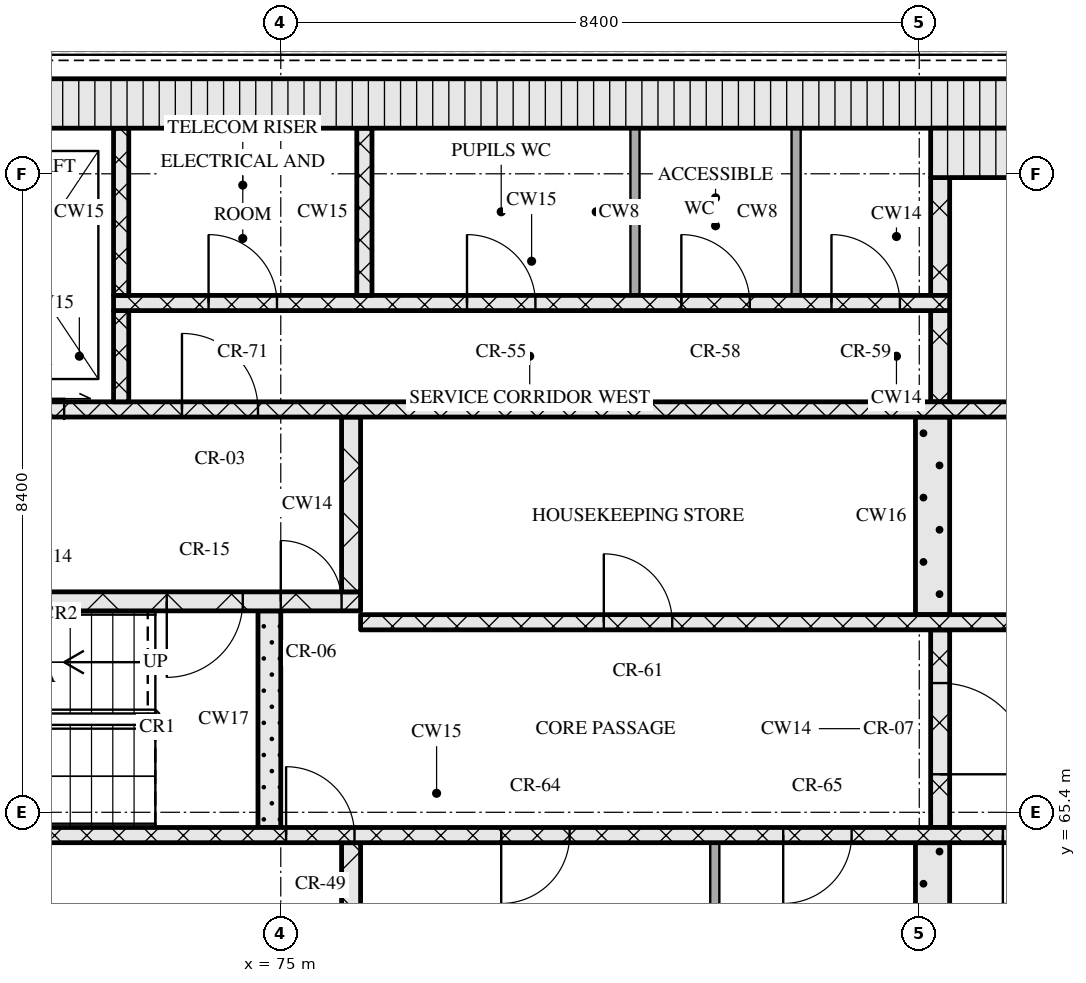
"""IFC4 building model, lengths in metres.
Left out: names, types, materials, properties, quantities, classifications, styles, units other than length and angle.
Written with IfcOpenShell. Run it as: python <this file> out.ifc"""

import sys

from ifc_helpers import new_model, si_unit, direction, frame, frame_2d, origin, place, context, subcontext, project, spatial, rectangle, extrude, element, fill, save


model = new_model("IFC4")
c1 = context("Model", 3, precision=1e-05, world=origin(), true_north=direction((0.0, 1.0)))
c2 = subcontext(c1, "Body", "Model", "MODEL_VIEW")
j1 = project(units=[si_unit("LENGTHUNIT", "METRE"), si_unit("PLANEANGLEUNIT", "RADIAN")], contexts=[c1])
p1 = place(None, origin())
s1 = spatial("IfcSite", under=j1, at=p1, CompositionType="ELEMENT")
p2 = place(p1, origin())
s2 = spatial("IfcBuilding", under=s1, at=p2, CompositionType="ELEMENT")
p3 = place(p2, frame((0.0, 0.0, 223.5)))
s3 = spatial("IfcBuildingStorey", under=s2, at=p3, CompositionType="ELEMENT", Elevation=223.5)
p4 = place(p3, frame((67.15, 74.725, 0.0), z_axis=(0.0, 0.0, 1.0), x_axis=(1.0, 0.0, 0.0)))
e1 = element("IfcWall", 1, at=p4, inside=s3, PredefinedType="SOLIDWALL", context=c2, shape_type="SweptSolid", body=[
    extrude(rectangle(XDim=40.9, YDim=0.65, at=frame_2d((20.45, 0.0))), origin(), (0.0, 0.0, 1.0), 3.32),
])
p5 = place(p3, frame((75.925, 62.4, 0.0), z_axis=(0.0, 0.0, 1.0), x_axis=(0.0, 1.0, 0.0)))
e2 = element("IfcWall", 2, at=p5, inside=s3, PredefinedType="SOLIDWALL", context=c2, shape_type="SweptSolid", body=[
    extrude(rectangle(XDim=2.6, YDim=0.25, at=frame_2d((1.3, 0.0))), origin(), (0.0, 0.0, 1.0), 3.32),
])
p6 = place(p3, frame((80.71, 62.4, 0.0), z_axis=(0.0, 0.0, 1.0), x_axis=(0.0, 1.0, 0.0)))
e3 = element("IfcWall", 3, at=p6, inside=s3, PredefinedType="PARTITIONING", context=c2, shape_type="SweptSolid", body=[
    extrude(rectangle(XDim=2.6, YDim=0.12, at=frame_2d((1.3, 0.0))), origin(), (0.0, 0.0, 1.0), 3.32),
])
p7 = place(p3, frame((83.575, 62.4, 0.0), z_axis=(0.0, 0.0, 1.0), x_axis=(0.0, 1.0, 0.0)))
e4 = element("IfcWall", 4, at=p7, inside=s3, PredefinedType="SOLIDWALL", context=c2, shape_type="SweptSolid", body=[
    extrude(rectangle(XDim=2.6, YDim=0.45, at=frame_2d((1.3, 0.0))), origin(), (0.0, 0.0, 1.0), 3.32),
])
p8 = place(p3, frame((67.8, 65.1, 0.0), z_axis=(0.0, 0.0, 1.0), x_axis=(1.0, 0.0, 0.0)))
e5 = element("IfcWall", 5, at=p8, inside=s3, PredefinedType="SOLIDWALL", context=c2, shape_type="SweptSolid", body=[
    extrude(rectangle(XDim=18.5, YDim=0.2, at=frame_2d((9.25, 0.0))), origin(), (0.0, 0.0, 1.0), 3.32),
])
p9 = place(p8, frame((7.27, 0.0, 0.0)))
e6 = element("IfcOpeningElement", 6, at=p9, cuts=e5, PredefinedType="OPENING", context=c2, shape_type="SweptSolid", body=[
    extrude(rectangle(XDim=0.9, YDim=2.1, at=frame_2d((0.45, 1.05))), frame((0.0, 0.11, 0.0), z_axis=(0.0, -1.0, 0.0), x_axis=(1.0, 0.0, 0.0)), (0.0, 0.0, 1.0), 0.22),
])
p10 = place(p8, frame((10.1, 0.0, 0.0)))
e7 = element("IfcOpeningElement", 7, at=p10, cuts=e5, PredefinedType="OPENING", context=c2, shape_type="SweptSolid", body=[
    extrude(rectangle(XDim=0.9, YDim=2.1, at=frame_2d((0.45, 1.05))), frame((0.0, 0.11, 0.0), z_axis=(0.0, -1.0, 0.0), x_axis=(1.0, 0.0, 0.0)), (0.0, 0.0, 1.0), 0.22),
])
p11 = place(p8, frame((13.81, 0.0, 0.0)))
e8 = element("IfcOpeningElement", 8, at=p11, cuts=e5, PredefinedType="OPENING", context=c2, shape_type="SweptSolid", body=[
    extrude(rectangle(XDim=0.9, YDim=2.1, at=frame_2d((0.45, 1.05))), frame((0.0, 0.11, 0.0), z_axis=(0.0, -1.0, 0.0), x_axis=(1.0, 0.0, 0.0)), (0.0, 0.0, 1.0), 0.22),
])
p12 = place(p8, frame((16.7, 0.0, 0.0)))
e9 = element("IfcOpeningElement", 9, at=p12, cuts=e5, PredefinedType="OPENING", context=c2, shape_type="SweptSolid", body=[
    extrude(rectangle(XDim=0.9, YDim=2.1, at=frame_2d((0.45, 1.05))), frame((0.0, 0.11, 0.0), z_axis=(0.0, -1.0, 0.0), x_axis=(1.0, 0.0, 0.0)), (0.0, 0.0, 1.0), 0.22),
])
p13 = place(p3, frame((74.85, 65.2, 0.0), z_axis=(0.0, 0.0, 1.0), x_axis=(0.0, 1.0, 0.0)))
e10 = element("IfcWall", 10, at=p13, inside=s3, PredefinedType="SOLIDWALL", context=c2, shape_type="SweptSolid", body=[
    extrude(rectangle(XDim=2.85, YDim=0.3, at=frame_2d((1.425, 0.0))), origin(), (0.0, 0.0, 1.0), 3.32),
])
p14 = place(p3, frame((83.675, 65.2, 0.0), z_axis=(0.0, 0.0, 1.0), x_axis=(0.0, 1.0, 0.0)))
e11 = element("IfcWall", 11, at=p14, inside=s3, PredefinedType="SOLIDWALL", context=c2, shape_type="SweptSolid", body=[
    extrude(rectangle(XDim=2.6, YDim=0.25, at=frame_2d((1.3, 0.0))), origin(), (0.0, 0.0, 1.0), 3.32),
])
p15 = place(p14, frame((0.7, 0.0, 0.0)))
e12 = element("IfcOpeningElement", 12, at=p15, cuts=e11, PredefinedType="OPENING", context=c2, shape_type="SweptSolid", body=[
    extrude(rectangle(XDim=1.2, YDim=2.1, at=frame_2d((0.6, 1.05))), frame((0.0, 0.135, 0.0), z_axis=(0.0, -1.0, 0.0), x_axis=(1.0, 0.0, 0.0)), (0.0, 0.0, 1.0), 0.27),
])
p16 = place(p3, frame((76.05, 67.9, 0.0), z_axis=(0.0, 0.0, 1.0), x_axis=(1.0, 0.0, 0.0)))
e13 = element("IfcWall", 13, at=p16, inside=s3, PredefinedType="SOLIDWALL", context=c2, shape_type="SweptSolid", body=[
    extrude(rectangle(XDim=23.1, YDim=0.2, at=frame_2d((11.55, 0.0))), origin(), (0.0, 0.0, 1.0), 3.32),
])
p17 = place(p16, frame((3.2, 0.0, 0.0)))
e14 = element("IfcOpeningElement", 14, at=p17, cuts=e13, PredefinedType="OPENING", context=c2, shape_type="SweptSolid", body=[
    extrude(rectangle(XDim=0.9, YDim=2.1, at=frame_2d((0.45, 1.05))), frame((0.0, 0.11, 0.0), z_axis=(0.0, -1.0, 0.0), x_axis=(1.0, 0.0, 0.0)), (0.0, 0.0, 1.0), 0.22),
])
p18 = place(p16, frame((9.7, 0.0, 0.0)))
e15 = element("IfcOpeningElement", 15, at=p18, cuts=e13, PredefinedType="OPENING", context=c2, shape_type="SweptSolid", body=[
    extrude(rectangle(XDim=0.9, YDim=2.1, at=frame_2d((0.45, 1.05))), frame((0.0, 0.11, 0.0), z_axis=(0.0, -1.0, 0.0), x_axis=(1.0, 0.0, 0.0)), (0.0, 0.0, 1.0), 0.22),
])
p19 = place(p16, frame((13.55, 0.0, 0.0)))
e16 = element("IfcOpeningElement", 16, at=p19, cuts=e13, PredefinedType="OPENING", context=c2, shape_type="SweptSolid", body=[
    extrude(rectangle(XDim=1.0, YDim=2.1, at=frame_2d((0.5, 1.05))), frame((0.0, 0.11, 0.0), z_axis=(0.0, -1.0, 0.0), x_axis=(1.0, 0.0, 0.0)), (0.0, 0.0, 1.0), 0.22),
])
p20 = place(p16, frame((16.2, 0.0, 0.0)))
e17 = element("IfcOpeningElement", 17, at=p20, cuts=e13, PredefinedType="OPENING", context=c2, shape_type="SweptSolid", body=[
    extrude(rectangle(XDim=1.1, YDim=2.1, at=frame_2d((0.55, 1.05))), frame((0.0, 0.11, 0.0), z_axis=(0.0, -1.0, 0.0), x_axis=(1.0, 0.0, 0.0)), (0.0, 0.0, 1.0), 0.22),
])
p21 = place(p16, frame((18.7, 0.0, 0.0)))
e18 = element("IfcOpeningElement", 18, at=p21, cuts=e13, PredefinedType="OPENING", context=c2, shape_type="SweptSolid", body=[
    extrude(rectangle(XDim=1.1, YDim=2.1, at=frame_2d((0.55, 1.05))), frame((0.0, 0.11, 0.0), z_axis=(0.0, -1.0, 0.0), x_axis=(1.0, 0.0, 0.0)), (0.0, 0.0, 1.0), 0.22),
])
p22 = place(p16, frame((21.2, 0.0, 0.0)))
e19 = element("IfcOpeningElement", 19, at=p22, cuts=e13, PredefinedType="OPENING", context=c2, shape_type="SweptSolid", body=[
    extrude(rectangle(XDim=1.1, YDim=2.1, at=frame_2d((0.55, 1.05))), frame((0.0, 0.11, 0.0), z_axis=(0.0, -1.0, 0.0), x_axis=(1.0, 0.0, 0.0)), (0.0, 0.0, 1.0), 0.22),
])
p23 = place(p3, frame((83.575, 68.0, 0.0), z_axis=(0.0, 0.0, 1.0), x_axis=(0.0, 1.0, 0.0)))
e20 = element("IfcWall", 20, at=p23, inside=s3, PredefinedType="SOLIDWALL", context=c2, shape_type="SweptSolid", body=[
    extrude(rectangle(XDim=2.6, YDim=0.45, at=frame_2d((1.3, 0.0))), origin(), (0.0, 0.0, 1.0), 3.32),
])
p24 = place(p3, frame((67.8, 68.175, 0.0), z_axis=(0.0, 0.0, 1.0), x_axis=(1.0, 0.0, 0.0)))
e21 = element("IfcWall", 21, at=p24, inside=s3, PredefinedType="SOLIDWALL", context=c2, shape_type="SweptSolid", body=[
    extrude(rectangle(XDim=8.25, YDim=0.25, at=frame_2d((4.125, 0.0))), origin(), (0.0, 0.0, 1.0), 3.32),
])
p25 = place(p24, frame((5.7, 0.0, 0.0)))
e22 = element("IfcOpeningElement", 22, at=p25, cuts=e21, PredefinedType="OPENING", context=c2, shape_type="SweptSolid", body=[
    extrude(rectangle(XDim=1.0, YDim=2.1, at=frame_2d((0.5, 1.05))), frame((0.0, 0.135, 0.0), z_axis=(0.0, -1.0, 0.0), x_axis=(1.0, 0.0, 0.0)), (0.0, 0.0, 1.0), 0.27),
])
p26 = place(p24, frame((7.2, 0.0, 0.0)))
e23 = element("IfcOpeningElement", 23, at=p26, cuts=e21, PredefinedType="OPENING", context=c2, shape_type="SweptSolid", body=[
    extrude(rectangle(XDim=0.8, YDim=2.1, at=frame_2d((0.4, 1.05))), frame((0.0, 0.135, 0.0), z_axis=(0.0, -1.0, 0.0), x_axis=(1.0, 0.0, 0.0)), (0.0, 0.0, 1.0), 0.27),
])
p27 = place(p3, frame((75.925, 68.3, 0.0), z_axis=(0.0, 0.0, 1.0), x_axis=(0.0, 1.0, 0.0)))
e24 = element("IfcWall", 24, at=p27, inside=s3, PredefinedType="SOLIDWALL", context=c2, shape_type="SweptSolid", body=[
    extrude(rectangle(XDim=2.3, YDim=0.25, at=frame_2d((1.15, 0.0))), origin(), (0.0, 0.0, 1.0), 3.32),
])
p28 = place(p3, frame((67.8, 70.7, 0.0), z_axis=(0.0, 0.0, 1.0), x_axis=(1.0, 0.0, 0.0)))
e25 = element("IfcWall", 25, at=p28, inside=s3, PredefinedType="SOLIDWALL", context=c2, shape_type="SweptSolid", body=[
    extrude(rectangle(XDim=39.6, YDim=0.2, at=frame_2d((19.8, 0.0))), origin(), (0.0, 0.0, 1.0), 3.32),
])
p29 = place(p28, frame((0.65, 0.0, 0.0)))
e26 = element("IfcOpeningElement", 26, at=p29, cuts=e25, PredefinedType="OPENING", context=c2, shape_type="SweptSolid", body=[
    extrude(rectangle(XDim=1.1, YDim=2.1, at=frame_2d((0.55, 1.05))), frame((0.0, 0.11, 0.0), z_axis=(0.0, -1.0, 0.0), x_axis=(1.0, 0.0, 0.0)), (0.0, 0.0, 1.0), 0.22),
])
p30 = place(p28, frame((3.25, 0.0, 0.0)))
e27 = element("IfcOpeningElement", 27, at=p30, cuts=e25, PredefinedType="OPENING", context=c2, shape_type="SweptSolid", body=[
    extrude(rectangle(XDim=1.1, YDim=2.1, at=frame_2d((0.55, 1.05))), frame((0.0, 0.11, 0.0), z_axis=(0.0, -1.0, 0.0), x_axis=(1.0, 0.0, 0.0)), (0.0, 0.0, 1.0), 0.22),
])
p31 = place(p28, frame((5.9, 0.0, 0.0)))
e28 = element("IfcOpeningElement", 28, at=p31, cuts=e25, PredefinedType="OPENING", context=c2, shape_type="SweptSolid", body=[
    extrude(rectangle(XDim=1.0, YDim=2.1, at=frame_2d((0.5, 1.05))), frame((0.0, 0.11, 0.0), z_axis=(0.0, -1.0, 0.0), x_axis=(1.0, 0.0, 0.0)), (0.0, 0.0, 1.0), 0.22),
])
p32 = place(p28, frame((21.7, 0.0, 0.0)))
e29 = element("IfcOpeningElement", 29, at=p32, cuts=e25, PredefinedType="OPENING", context=c2, shape_type="SweptSolid", body=[
    extrude(rectangle(XDim=1.0, YDim=2.1, at=frame_2d((0.5, 1.05))), frame((0.0, 0.11, 0.0), z_axis=(0.0, -1.0, 0.0), x_axis=(1.0, 0.0, 0.0)), (0.0, 0.0, 1.0), 0.22),
])
p33 = place(p28, frame((32.7, 0.0, 0.0)))
e30 = element("IfcOpeningElement", 30, at=p33, cuts=e25, PredefinedType="OPENING", context=c2, shape_type="SweptSolid", body=[
    extrude(rectangle(XDim=1.0, YDim=2.1, at=frame_2d((0.5, 1.05))), frame((0.0, 0.11, 0.0), z_axis=(0.0, -1.0, 0.0), x_axis=(1.0, 0.0, 0.0)), (0.0, 0.0, 1.0), 0.22),
])
p34 = place(p28, frame((35.25, 0.0, 0.0)))
e31 = element("IfcOpeningElement", 31, at=p34, cuts=e25, PredefinedType="OPENING", context=c2, shape_type="SweptSolid", body=[
    extrude(rectangle(XDim=1.1, YDim=2.1, at=frame_2d((0.55, 1.05))), frame((0.0, 0.11, 0.0), z_axis=(0.0, -1.0, 0.0), x_axis=(1.0, 0.0, 0.0)), (0.0, 0.0, 1.0), 0.22),
])
p35 = place(p28, frame((37.85, 0.0, 0.0)))
e32 = element("IfcOpeningElement", 32, at=p35, cuts=e25, PredefinedType="OPENING", context=c2, shape_type="SweptSolid", body=[
    extrude(rectangle(XDim=1.1, YDim=2.1, at=frame_2d((0.55, 1.05))), frame((0.0, 0.11, 0.0), z_axis=(0.0, -1.0, 0.0), x_axis=(1.0, 0.0, 0.0)), (0.0, 0.0, 1.0), 0.22),
])
p36 = place(p3, frame((72.9, 70.8, 0.0), z_axis=(0.0, 0.0, 1.0), x_axis=(0.0, 1.0, 0.0)))
e33 = element("IfcWall", 33, at=p36, inside=s3, PredefinedType="SOLIDWALL", context=c2, shape_type="SweptSolid", body=[
    extrude(rectangle(XDim=1.2, YDim=0.2, at=frame_2d((0.6, 0.0))), origin(), (0.0, 0.0, 1.0), 3.32),
])
p37 = place(p3, frame((83.675, 70.8, 0.0), z_axis=(0.0, 0.0, 1.0), x_axis=(0.0, 1.0, 0.0)))
e34 = element("IfcWall", 34, at=p37, inside=s3, PredefinedType="SOLIDWALL", context=c2, shape_type="SweptSolid", body=[
    extrude(rectangle(XDim=1.2, YDim=0.25, at=frame_2d((0.6, 0.0))), origin(), (0.0, 0.0, 1.0), 3.32),
])
p38 = place(p3, frame((72.8, 72.1, 0.0), z_axis=(0.0, 0.0, 1.0), x_axis=(1.0, 0.0, 0.0)))
e35 = element("IfcWall", 35, at=p38, inside=s3, PredefinedType="SOLIDWALL", context=c2, shape_type="SweptSolid", body=[
    extrude(rectangle(XDim=11.0, YDim=0.2, at=frame_2d((5.5, 0.0))), origin(), (0.0, 0.0, 1.0), 3.32),
])
p39 = place(p38, frame((1.25, 0.0, 0.0)))
e36 = element("IfcOpeningElement", 36, at=p39, cuts=e35, PredefinedType="OPENING", context=c2, shape_type="SweptSolid", body=[
    extrude(rectangle(XDim=0.9, YDim=2.1, at=frame_2d((0.45, 1.05))), frame((0.0, 0.11, 0.0), z_axis=(0.0, -1.0, 0.0), x_axis=(1.0, 0.0, 0.0)), (0.0, 0.0, 1.0), 0.22),
])
p40 = place(p38, frame((4.65, 0.0, 0.0)))
e37 = element("IfcOpeningElement", 37, at=p40, cuts=e35, PredefinedType="OPENING", context=c2, shape_type="SweptSolid", body=[
    extrude(rectangle(XDim=0.9, YDim=2.1, at=frame_2d((0.45, 1.05))), frame((0.0, 0.11, 0.0), z_axis=(0.0, -1.0, 0.0), x_axis=(1.0, 0.0, 0.0)), (0.0, 0.0, 1.0), 0.22),
])
p41 = place(p38, frame((7.47, 0.0, 0.0)))
e38 = element("IfcOpeningElement", 38, at=p41, cuts=e35, PredefinedType="OPENING", context=c2, shape_type="SweptSolid", body=[
    extrude(rectangle(XDim=0.9, YDim=2.1, at=frame_2d((0.45, 1.05))), frame((0.0, 0.11, 0.0), z_axis=(0.0, -1.0, 0.0), x_axis=(1.0, 0.0, 0.0)), (0.0, 0.0, 1.0), 0.22),
])
p42 = place(p38, frame((9.445, 0.0, 0.0)))
e39 = element("IfcOpeningElement", 39, at=p42, cuts=e35, PredefinedType="OPENING", context=c2, shape_type="SweptSolid", body=[
    extrude(rectangle(XDim=0.9, YDim=2.1, at=frame_2d((0.45, 1.05))), frame((0.0, 0.11, 0.0), z_axis=(0.0, -1.0, 0.0), x_axis=(1.0, 0.0, 0.0)), (0.0, 0.0, 1.0), 0.22),
])
for number, where, z_axis, x_axis in (
    (40, (72.9, 72.2, 0.0), (0.0, 0.0, 1.0), (0.0, 1.0, 0.0)),
    (41, (76.1, 72.2, 0.0), (0.0, 0.0, 1.0), (0.0, 1.0, 0.0)),
):
    element("IfcWall", number, at=place(p3, frame(where, z_axis=z_axis, x_axis=x_axis)), inside=s3, PredefinedType="SOLIDWALL", context=c2, shape_type="SweptSolid", body=[
        extrude(rectangle(XDim=2.2, YDim=0.2, at=frame_2d((1.1, 0.0))), origin(), (0.0, 0.0, 1.0), 3.32),
    ])
for number, where, z_axis, x_axis in (
    (42, (79.66, 72.2, 0.0), (0.0, 0.0, 1.0), (0.0, 1.0, 0.0)),
    (43, (81.78, 72.2, 0.0), (0.0, 0.0, 1.0), (0.0, 1.0, 0.0)),
):
    element("IfcWall", number, at=place(p3, frame(where, z_axis=z_axis, x_axis=x_axis)), inside=s3, PredefinedType="PARTITIONING", context=c2, shape_type="SweptSolid", body=[
        extrude(rectangle(XDim=2.2, YDim=0.12, at=frame_2d((1.1, 0.0))), origin(), (0.0, 0.0, 1.0), 3.32),
    ])
p43 = place(p3, frame((83.675, 72.2, 0.0), z_axis=(0.0, 0.0, 1.0), x_axis=(0.0, 1.0, 0.0)))
e44 = element("IfcWall", 44, at=p43, inside=s3, PredefinedType="SOLIDWALL", context=c2, shape_type="SweptSolid", body=[
    extrude(rectangle(XDim=1.55, YDim=0.25, at=frame_2d((0.775, 0.0))), origin(), (0.0, 0.0, 1.0), 3.32),
])
p44 = place(p3, frame((83.55, 74.075, 0.0), z_axis=(0.0, 0.0, 1.0), x_axis=(1.0, 0.0, 0.0)))
e45 = element("IfcWall", 45, at=p44, inside=s3, PredefinedType="SOLIDWALL", context=c2, shape_type="SweptSolid", body=[
    extrude(rectangle(XDim=8.1, YDim=0.65, at=frame_2d((4.05, 0.0))), origin(), (0.0, 0.0, 1.0), 3.32),
])
p45 = place(p9, origin())
e46 = element("IfcDoor", 46, at=p45, inside=s3, OperationType="SINGLE_SWING_LEFT", PredefinedType="DOOR", context=c2, shape_type="SweptSolid", body=[
    extrude(rectangle(XDim=0.9, YDim=2.1, at=frame_2d((0.45, 1.05))), frame((0.0, 0.025, 0.0), z_axis=(0.0, -1.0, 0.0), x_axis=(1.0, 0.0, 0.0)), (0.0, 0.0, 1.0), 0.05),
])
fill(e6, e46)
p46 = place(p10, origin())
e47 = element("IfcDoor", 47, at=p46, inside=s3, OperationType="SINGLE_SWING_RIGHT", PredefinedType="DOOR", context=c2, shape_type="SweptSolid", body=[
    extrude(rectangle(XDim=0.9, YDim=2.1, at=frame_2d((0.45, 1.05))), frame((0.0, 0.025, 0.0), z_axis=(0.0, -1.0, 0.0), x_axis=(1.0, 0.0, 0.0)), (0.0, 0.0, 1.0), 0.05),
])
fill(e7, e47)
p47 = place(p11, origin())
e48 = element("IfcDoor", 48, at=p47, inside=s3, OperationType="SINGLE_SWING_RIGHT", PredefinedType="DOOR", context=c2, shape_type="SweptSolid", body=[
    extrude(rectangle(XDim=0.9, YDim=2.1, at=frame_2d((0.45, 1.05))), frame((0.0, 0.025, 0.0), z_axis=(0.0, -1.0, 0.0), x_axis=(1.0, 0.0, 0.0)), (0.0, 0.0, 1.0), 0.05),
])
fill(e8, e48)
p48 = place(p12, origin())
e49 = element("IfcDoor", 49, at=p48, inside=s3, OperationType="SINGLE_SWING_RIGHT", PredefinedType="DOOR", context=c2, shape_type="SweptSolid", body=[
    extrude(rectangle(XDim=0.9, YDim=2.1, at=frame_2d((0.45, 1.05))), frame((0.0, 0.025, 0.0), z_axis=(0.0, -1.0, 0.0), x_axis=(1.0, 0.0, 0.0)), (0.0, 0.0, 1.0), 0.05),
])
fill(e9, e49)
p49 = place(p15, origin())
e50 = element("IfcDoor", 50, at=p49, inside=s3, OperationType="SINGLE_SWING_RIGHT", PredefinedType="DOOR", context=c2, shape_type="SweptSolid", body=[
    extrude(rectangle(XDim=1.2, YDim=2.1, at=frame_2d((0.6, 1.05))), frame((0.0, 0.025, 0.0), z_axis=(0.0, -1.0, 0.0), x_axis=(1.0, 0.0, 0.0)), (0.0, 0.0, 1.0), 0.05),
])
fill(e12, e50)
p50 = place(p17, origin())
e51 = element("IfcDoor", 51, at=p50, inside=s3, OperationType="SINGLE_SWING_LEFT", PredefinedType="DOOR", context=c2, shape_type="SweptSolid", body=[
    extrude(rectangle(XDim=0.9, YDim=2.1, at=frame_2d((0.45, 1.05))), frame((0.0, 0.025, 0.0), z_axis=(0.0, -1.0, 0.0), x_axis=(1.0, 0.0, 0.0)), (0.0, 0.0, 1.0), 0.05),
])
fill(e14, e51)
p51 = place(p25, origin())
e52 = element("IfcDoor", 52, at=p51, inside=s3, OperationType="SINGLE_SWING_RIGHT", PredefinedType="DOOR", context=c2, shape_type="SweptSolid", body=[
    extrude(rectangle(XDim=1.0, YDim=2.1, at=frame_2d((0.5, 1.05))), frame((0.0, 0.025, 0.0), z_axis=(0.0, -1.0, 0.0), x_axis=(1.0, 0.0, 0.0)), (0.0, 0.0, 1.0), 0.05),
])
fill(e22, e52)
p52 = place(p26, origin())
e53 = element("IfcDoor", 53, at=p52, inside=s3, OperationType="SINGLE_SWING_LEFT", PredefinedType="DOOR", context=c2, shape_type="SweptSolid", body=[
    extrude(rectangle(XDim=0.8, YDim=2.1, at=frame_2d((0.4, 1.05))), frame((0.0, 0.025, 0.0), z_axis=(0.0, -1.0, 0.0), x_axis=(1.0, 0.0, 0.0)), (0.0, 0.0, 1.0), 0.05),
])
fill(e23, e53)
p53 = place(p30, origin())
e54 = element("IfcDoor", 54, at=p53, inside=s3, OperationType="SLIDING_TO_RIGHT", PredefinedType="DOOR", context=c2, shape_type="SweptSolid", body=[
    extrude(rectangle(XDim=1.1, YDim=2.1, at=frame_2d((0.55, 1.05))), frame((0.0, 0.025, 0.0), z_axis=(0.0, -1.0, 0.0), x_axis=(1.0, 0.0, 0.0)), (0.0, 0.0, 1.0), 0.05),
])
fill(e27, e54)
p54 = place(p31, origin())
e55 = element("IfcDoor", 55, at=p54, inside=s3, OperationType="SINGLE_SWING_LEFT", PredefinedType="DOOR", context=c2, shape_type="SweptSolid", body=[
    extrude(rectangle(XDim=1.0, YDim=2.1, at=frame_2d((0.5, 1.05))), frame((0.0, 0.025, 0.0), z_axis=(0.0, -1.0, 0.0), x_axis=(1.0, 0.0, 0.0)), (0.0, 0.0, 1.0), 0.05),
])
fill(e28, e55)
p55 = place(p39, origin())
e56 = element("IfcDoor", 56, at=p55, inside=s3, OperationType="SINGLE_SWING_LEFT", PredefinedType="DOOR", context=c2, shape_type="SweptSolid", body=[
    extrude(rectangle(XDim=0.9, YDim=2.1, at=frame_2d((0.45, 1.05))), frame((0.0, 0.025, 0.0), z_axis=(0.0, -1.0, 0.0), x_axis=(1.0, 0.0, 0.0)), (0.0, 0.0, 1.0), 0.05),
])
fill(e36, e56)
p56 = place(p40, origin())
e57 = element("IfcDoor", 57, at=p56, inside=s3, OperationType="SINGLE_SWING_LEFT", PredefinedType="DOOR", context=c2, shape_type="SweptSolid", body=[
    extrude(rectangle(XDim=0.9, YDim=2.1, at=frame_2d((0.45, 1.05))), frame((0.0, 0.025, 0.0), z_axis=(0.0, -1.0, 0.0), x_axis=(1.0, 0.0, 0.0)), (0.0, 0.0, 1.0), 0.05),
])
fill(e37, e57)
p57 = place(p41, origin())
e58 = element("IfcDoor", 58, at=p57, inside=s3, OperationType="SINGLE_SWING_LEFT", PredefinedType="DOOR", context=c2, shape_type="SweptSolid", body=[
    extrude(rectangle(XDim=0.9, YDim=2.1, at=frame_2d((0.45, 1.05))), frame((0.0, 0.025, 0.0), z_axis=(0.0, -1.0, 0.0), x_axis=(1.0, 0.0, 0.0)), (0.0, 0.0, 1.0), 0.05),
])
fill(e38, e58)
p58 = place(p42, origin())
e59 = element("IfcDoor", 59, at=p58, inside=s3, OperationType="SINGLE_SWING_LEFT", PredefinedType="DOOR", context=c2, shape_type="SweptSolid", body=[
    extrude(rectangle(XDim=0.9, YDim=2.1, at=frame_2d((0.45, 1.05))), frame((0.0, 0.025, 0.0), z_axis=(0.0, -1.0, 0.0), x_axis=(1.0, 0.0, 0.0)), (0.0, 0.0, 1.0), 0.05),
])
fill(e39, e59)
save(model, sys.argv[1])
